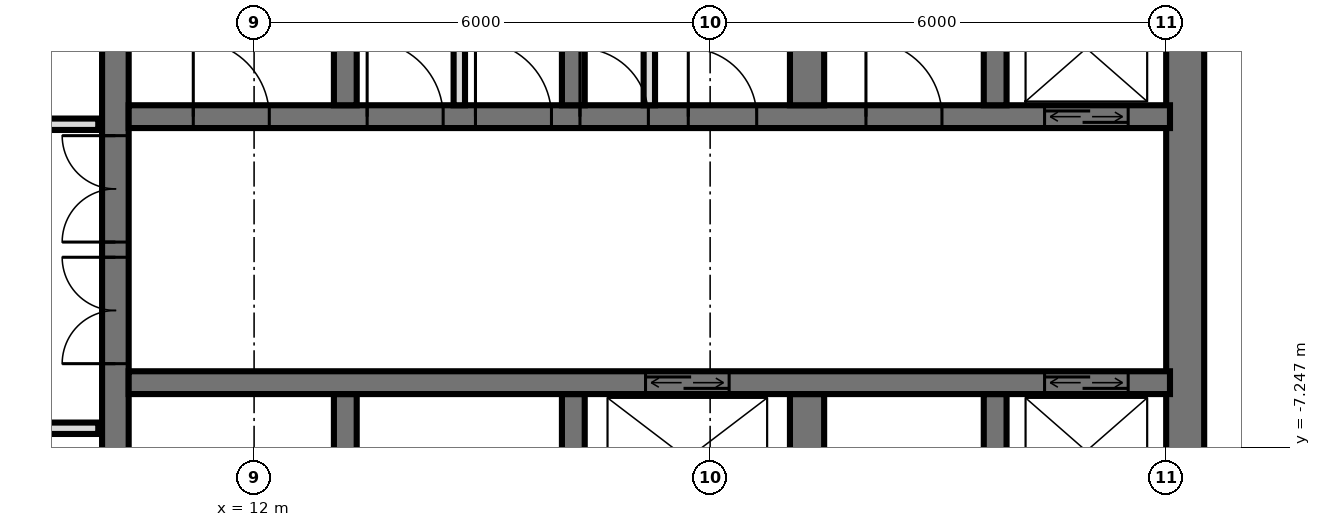
"""IFC4 building model, lengths in metres.
Left out: names, types, materials, properties, quantities, classifications, styles, units other than length and angle.
Written with IfcOpenShell. Run it as: python <this file> out.ifc"""

import sys

from ifc_helpers import new_model, si_unit, direction, frame, frame_2d, origin, place, context, subcontext, project, spatial, rectangle, extrude, element, fill, save


model = new_model("IFC4")
c1 = context("Model", 3, precision=1e-05, world=origin(), true_north=direction((0.0, 1.0)))
c2 = subcontext(c1, "Body", "Model", "MODEL_VIEW")
j1 = project(units=[si_unit("LENGTHUNIT", "METRE"), si_unit("PLANEANGLEUNIT", "RADIAN")], contexts=[c1])
p1 = place(None, origin())
s1 = spatial("IfcSite", under=j1, at=p1, CompositionType="ELEMENT")
p2 = place(p1, origin())
s2 = spatial("IfcBuilding", under=s1, at=p2, CompositionType="ELEMENT")
p3 = place(p2, frame((0.0, 0.0, 123.6)))
s3 = spatial("IfcBuildingStorey", under=s2, at=p3, CompositionType="ELEMENT", Elevation=123.6)
p4 = place(p3, frame((10.175, -14.55, 0.0), z_axis=(0.0, 0.0, 1.0), x_axis=(0.0, 1.0, 0.0)))
e1 = element("IfcWall", 1, at=p4, inside=s3, PredefinedType="SHEAR", context=c2, shape_type="SweptSolid", body=[
    extrude(rectangle(XDim=14.1, YDim=0.35, at=frame_2d((7.05, 0.0))), origin(), (0.0, 0.0, 1.0), 3.6),
])
p5 = place(p4, frame((8.4, 0.0, 0.0)))
e2 = element("IfcOpeningElement", 2, at=p5, cuts=e1, PredefinedType="OPENING", context=c2, shape_type="SweptSolid", body=[
    extrude(rectangle(XDim=1.4, YDim=2.4, at=frame_2d((0.7, 1.2))), frame((0.0, 0.185, 0.0), z_axis=(0.0, -1.0, 0.0), x_axis=(1.0, 0.0, 0.0)), (0.0, 0.0, 1.0), 0.37),
])
p6 = place(p4, frame((10.0, 0.0, 0.0)))
e3 = element("IfcOpeningElement", 3, at=p6, cuts=e1, PredefinedType="OPENING", context=c2, shape_type="SweptSolid", body=[
    extrude(rectangle(XDim=1.4, YDim=2.4, at=frame_2d((0.7, 1.2))), frame((0.0, 0.185, 0.0), z_axis=(0.0, -1.0, 0.0), x_axis=(1.0, 0.0, 0.0)), (0.0, 0.0, 1.0), 0.37),
])
p7 = place(p4, frame((4.0, 0.0, 0.0)))
e4 = element("IfcOpeningElement", 4, at=p7, cuts=e1, PredefinedType="OPENING", context=c2, shape_type="SweptSolid", body=[
    extrude(rectangle(XDim=1.2, YDim=2.1, at=frame_2d((0.6, 1.05))), frame((0.0, 0.185, 0.0), z_axis=(0.0, -1.0, 0.0), x_axis=(1.0, 0.0, 0.0)), (0.0, 0.0, 1.0), 0.37),
])
p8 = place(p3, frame((24.25, -14.55, 0.0), z_axis=(0.0, 0.0, 1.0), x_axis=(0.0, 1.0, 0.0)))
e5 = element("IfcWall", 5, at=p8, inside=s3, PredefinedType="SHEAR", context=c2, shape_type="SweptSolid", body=[
    extrude(rectangle(XDim=14.1, YDim=0.5, at=frame_2d((7.05, 0.0))), origin(), (0.0, 0.0, 1.0), 3.6),
])
p9 = place(p3, frame((10.35, -2.9, 0.0), z_axis=(0.0, 0.0, 1.0), x_axis=(1.0, 0.0, 0.0)))
e6 = element("IfcWall", 6, at=p9, inside=s3, PredefinedType="SHEAR", context=c2, shape_type="SweptSolid", body=[
    extrude(rectangle(XDim=13.7, YDim=0.3, at=frame_2d((6.85, 0.0))), origin(), (0.0, 0.0, 1.0), 3.6),
])
p10 = place(p9, frame((12.05, 0.0, 0.0)))
e7 = element("IfcOpeningElement", 7, at=p10, cuts=e6, PredefinedType="OPENING", context=c2, shape_type="SweptSolid", body=[
    extrude(rectangle(XDim=1.1, YDim=2.1, at=frame_2d((0.55, 1.05))), frame((0.0, 0.16, 0.0), z_axis=(0.0, -1.0, 0.0), x_axis=(1.0, 0.0, 0.0)), (0.0, 0.0, 1.0), 0.32),
])
p11 = place(p9, frame((5.938, 0.0, 0.0)))
e8 = element("IfcOpeningElement", 8, at=p11, cuts=e6, PredefinedType="OPENING", context=c2, shape_type="SweptSolid", body=[
    extrude(rectangle(XDim=0.9, YDim=2.1, at=frame_2d((0.45, 1.05))), frame((0.0, 0.16, 0.0), z_axis=(0.0, -1.0, 0.0), x_axis=(1.0, 0.0, 0.0)), (0.0, 0.0, 1.0), 0.32),
])
p12 = place(p9, frame((7.363, 0.0, 0.0)))
e9 = element("IfcOpeningElement", 9, at=p12, cuts=e6, PredefinedType="OPENING", context=c2, shape_type="SweptSolid", body=[
    extrude(rectangle(XDim=0.9, YDim=2.1, at=frame_2d((0.45, 1.05))), frame((0.0, 0.16, 0.0), z_axis=(0.0, -1.0, 0.0), x_axis=(1.0, 0.0, 0.0)), (0.0, 0.0, 1.0), 0.32),
])
p13 = place(p9, frame((0.85, 0.0, 0.0)))
e10 = element("IfcOpeningElement", 10, at=p13, cuts=e6, PredefinedType="OPENING", context=c2, shape_type="SweptSolid", body=[
    extrude(rectangle(XDim=1.0, YDim=2.1, at=frame_2d((0.5, 1.05))), frame((0.0, 0.16, 0.0), z_axis=(0.0, -1.0, 0.0), x_axis=(1.0, 0.0, 0.0)), (0.0, 0.0, 1.0), 0.32),
])
p14 = place(p9, frame((3.137, 0.0, 0.0)))
e11 = element("IfcOpeningElement", 11, at=p14, cuts=e6, PredefinedType="OPENING", context=c2, shape_type="SweptSolid", body=[
    extrude(rectangle(XDim=1.0, YDim=2.1, at=frame_2d((0.5, 1.05))), frame((0.0, 0.16, 0.0), z_axis=(0.0, -1.0, 0.0), x_axis=(1.0, 0.0, 0.0)), (0.0, 0.0, 1.0), 0.32),
])
p15 = place(p9, frame((4.562, 0.0, 0.0)))
e12 = element("IfcOpeningElement", 12, at=p15, cuts=e6, PredefinedType="OPENING", context=c2, shape_type="SweptSolid", body=[
    extrude(rectangle(XDim=1.0, YDim=2.1, at=frame_2d((0.5, 1.05))), frame((0.0, 0.16, 0.0), z_axis=(0.0, -1.0, 0.0), x_axis=(1.0, 0.0, 0.0)), (0.0, 0.0, 1.0), 0.32),
])
p16 = place(p9, frame((9.7, 0.0, 0.0)))
e13 = element("IfcOpeningElement", 13, at=p16, cuts=e6, PredefinedType="OPENING", context=c2, shape_type="SweptSolid", body=[
    extrude(rectangle(XDim=1.0, YDim=2.1, at=frame_2d((0.5, 1.05))), frame((0.0, 0.16, 0.0), z_axis=(0.0, -1.0, 0.0), x_axis=(1.0, 0.0, 0.0)), (0.0, 0.0, 1.0), 0.32),
])
p17 = place(p3, frame((10.35, -6.4, 0.0), z_axis=(0.0, 0.0, 1.0), x_axis=(1.0, 0.0, 0.0)))
e14 = element("IfcWall", 14, at=p17, inside=s3, PredefinedType="SHEAR", context=c2, shape_type="SweptSolid", body=[
    extrude(rectangle(XDim=13.7, YDim=0.3, at=frame_2d((6.85, 0.0))), origin(), (0.0, 0.0, 1.0), 3.6),
])
p18 = place(p17, frame((12.05, 0.0, 0.0)))
e15 = element("IfcOpeningElement", 15, at=p18, cuts=e14, PredefinedType="OPENING", context=c2, shape_type="SweptSolid", body=[
    extrude(rectangle(XDim=1.1, YDim=2.1, at=frame_2d((0.55, 1.05))), frame((0.0, 0.16, 0.0), z_axis=(0.0, -1.0, 0.0), x_axis=(1.0, 0.0, 0.0)), (0.0, 0.0, 1.0), 0.32),
])
p19 = place(p17, frame((6.8, 0.0, 0.0)))
e16 = element("IfcOpeningElement", 16, at=p19, cuts=e14, PredefinedType="OPENING", context=c2, shape_type="SweptSolid", body=[
    extrude(rectangle(XDim=1.1, YDim=2.1, at=frame_2d((0.55, 1.05))), frame((0.0, 0.16, 0.0), z_axis=(0.0, -1.0, 0.0), x_axis=(1.0, 0.0, 0.0)), (0.0, 0.0, 1.0), 0.32),
])
for number, where, z_axis, x_axis in (
    (17, (13.2, -2.75, 0.0), (0.0, 0.0, 1.0), (0.0, 1.0, 0.0)),
    (18, (13.2, -8.85, 0.0), (0.0, 0.0, 1.0), (0.0, 1.0, 0.0)),
    (19, (16.2, -2.75, 0.0), (0.0, 0.0, 1.0), (0.0, 1.0, 0.0)),
    (20, (16.2, -8.85, 0.0), (0.0, 0.0, 1.0), (0.0, 1.0, 0.0)),
):
    element("IfcWall", number, at=place(p3, frame(where, z_axis=z_axis, x_axis=x_axis)), inside=s3, PredefinedType="SHEAR", context=c2, shape_type="SweptSolid", body=[
        extrude(rectangle(XDim=2.3, YDim=0.3, at=frame_2d((1.15, 0.0))), origin(), (0.0, 0.0, 1.0), 3.6),
    ])
for number, where, z_axis, x_axis in (
    (21, (19.275, -2.75, 0.0), (0.0, 0.0, 1.0), (0.0, 1.0, 0.0)),
    (22, (19.275, -8.85, 0.0), (0.0, 0.0, 1.0), (0.0, 1.0, 0.0)),
):
    element("IfcWall", number, at=place(p3, frame(where, z_axis=z_axis, x_axis=x_axis)), inside=s3, PredefinedType="SHEAR", context=c2, shape_type="SweptSolid", body=[
        extrude(rectangle(XDim=2.3, YDim=0.45, at=frame_2d((1.15, 0.0))), origin(), (0.0, 0.0, 1.0), 3.6),
    ])
for number, where, z_axis, x_axis in (
    (23, (21.75, -2.75, 0.0), (0.0, 0.0, 1.0), (0.0, 1.0, 0.0)),
    (24, (21.75, -8.85, 0.0), (0.0, 0.0, 1.0), (0.0, 1.0, 0.0)),
):
    element("IfcWall", number, at=place(p3, frame(where, z_axis=z_axis, x_axis=x_axis)), inside=s3, PredefinedType="SHEAR", context=c2, shape_type="SweptSolid", body=[
        extrude(rectangle(XDim=2.3, YDim=0.3, at=frame_2d((1.15, 0.0))), origin(), (0.0, 0.0, 1.0), 3.6),
    ])
for number, where, z_axis, x_axis in (
    (25, (17.2, -2.75, 0.0), (0.0, 0.0, 1.0), (0.0, 1.0, 0.0)),
    (26, (14.7, -2.75, 0.0), (0.0, 0.0, 1.0), (0.0, 1.0, 0.0)),
):
    element("IfcWall", number, at=place(p3, frame(where, z_axis=z_axis, x_axis=x_axis)), inside=s3, PredefinedType="PARTITIONING", context=c2, shape_type="SweptSolid", body=[
        extrude(rectangle(XDim=2.3, YDim=0.15, at=frame_2d((1.15, 0.0))), origin(), (0.0, 0.0, 1.0), 3.3),
    ])
p20 = place(p3, frame((-9.95, -7.0, 0.0), z_axis=(0.0, 0.0, 1.0), x_axis=(1.0, 0.0, 0.0)))
e27 = element("IfcWall", 27, at=p20, inside=s3, PredefinedType="PARTITIONING", context=c2, shape_type="SweptSolid", body=[
    extrude(rectangle(XDim=19.9, YDim=0.15, at=frame_2d((9.95, 0.0))), origin(), (0.0, 0.0, 1.0), 3.32),
])
p21 = place(p20, frame((9.45, 0.0, 0.0)))
e28 = element("IfcOpeningElement", 28, at=p21, cuts=e27, PredefinedType="OPENING", context=c2, shape_type="SweptSolid", body=[
    extrude(rectangle(XDim=1.0, YDim=2.1, at=frame_2d((0.5, 1.05))), frame((0.0, 0.085, 0.0), z_axis=(0.0, -1.0, 0.0), x_axis=(1.0, 0.0, 0.0)), (0.0, 0.0, 1.0), 0.17),
])
p22 = place(p20, frame((15.45, 0.0, 0.0)))
e29 = element("IfcOpeningElement", 29, at=p22, cuts=e27, PredefinedType="OPENING", context=c2, shape_type="SweptSolid", body=[
    extrude(rectangle(XDim=1.0, YDim=2.1, at=frame_2d((0.5, 1.05))), frame((0.0, 0.085, 0.0), z_axis=(0.0, -1.0, 0.0), x_axis=(1.0, 0.0, 0.0)), (0.0, 0.0, 1.0), 0.17),
])
p23 = place(p3, frame((-9.95, -3.0, 0.0), z_axis=(0.0, 0.0, 1.0), x_axis=(1.0, 0.0, 0.0)))
e30 = element("IfcWall", 30, at=p23, inside=s3, PredefinedType="PARTITIONING", context=c2, shape_type="SweptSolid", body=[
    extrude(rectangle(XDim=19.9, YDim=0.15, at=frame_2d((9.95, 0.0))), origin(), (0.0, 0.0, 1.0), 3.32),
])
p24 = place(p23, frame((1.7, 0.0, 0.0)))
e31 = element("IfcOpeningElement", 31, at=p24, cuts=e30, PredefinedType="OPENING", context=c2, shape_type="SweptSolid", body=[
    extrude(rectangle(XDim=1.0, YDim=2.1, at=frame_2d((0.5, 1.05))), frame((0.0, 0.085, 0.0), z_axis=(0.0, -1.0, 0.0), x_axis=(1.0, 0.0, 0.0)), (0.0, 0.0, 1.0), 0.17),
])
p25 = place(p23, frame((5.45, 0.0, 0.0)))
e32 = element("IfcOpeningElement", 32, at=p25, cuts=e30, PredefinedType="OPENING", context=c2, shape_type="SweptSolid", body=[
    extrude(rectangle(XDim=1.0, YDim=2.1, at=frame_2d((0.5, 1.05))), frame((0.0, 0.085, 0.0), z_axis=(0.0, -1.0, 0.0), x_axis=(1.0, 0.0, 0.0)), (0.0, 0.0, 1.0), 0.17),
])
p26 = place(p23, frame((8.2, 0.0, 0.0)))
e33 = element("IfcOpeningElement", 33, at=p26, cuts=e30, PredefinedType="OPENING", context=c2, shape_type="SweptSolid", body=[
    extrude(rectangle(XDim=1.0, YDim=2.1, at=frame_2d((0.5, 1.05))), frame((0.0, 0.085, 0.0), z_axis=(0.0, -1.0, 0.0), x_axis=(1.0, 0.0, 0.0)), (0.0, 0.0, 1.0), 0.17),
])
p27 = place(p23, frame((11.95, 0.0, 0.0)))
e34 = element("IfcOpeningElement", 34, at=p27, cuts=e30, PredefinedType="OPENING", context=c2, shape_type="SweptSolid", body=[
    extrude(rectangle(XDim=1.0, YDim=2.1, at=frame_2d((0.5, 1.05))), frame((0.0, 0.085, 0.0), z_axis=(0.0, -1.0, 0.0), x_axis=(1.0, 0.0, 0.0)), (0.0, 0.0, 1.0), 0.17),
])
p28 = place(p23, frame((16.95, 0.0, 0.0)))
e35 = element("IfcOpeningElement", 35, at=p28, cuts=e30, PredefinedType="OPENING", context=c2, shape_type="SweptSolid", body=[
    extrude(rectangle(XDim=1.0, YDim=2.1, at=frame_2d((0.5, 1.05))), frame((0.0, 0.085, 0.0), z_axis=(0.0, -1.0, 0.0), x_axis=(1.0, 0.0, 0.0)), (0.0, 0.0, 1.0), 0.17),
])
p29 = place(p10, origin())
e36 = element("IfcDoor", 36, at=p29, inside=s3, OperationType="DOUBLE_DOOR_SLIDING", PredefinedType="USERDEFINED", context=c2, shape_type="SweptSolid", body=[
    extrude(rectangle(XDim=1.1, YDim=2.1, at=frame_2d((0.55, 1.05))), frame((0.0, 0.025, 0.0), z_axis=(0.0, -1.0, 0.0), x_axis=(1.0, 0.0, 0.0)), (0.0, 0.0, 1.0), 0.05),
])
fill(e7, e36)
p30 = place(p18, origin())
e37 = element("IfcDoor", 37, at=p30, inside=s3, OperationType="DOUBLE_DOOR_SLIDING", PredefinedType="USERDEFINED", context=c2, shape_type="SweptSolid", body=[
    extrude(rectangle(XDim=1.1, YDim=2.1, at=frame_2d((0.55, 1.05))), frame((0.0, 0.025, 0.0), z_axis=(0.0, -1.0, 0.0), x_axis=(1.0, 0.0, 0.0)), (0.0, 0.0, 1.0), 0.05),
])
fill(e15, e37)
p31 = place(p19, origin())
e38 = element("IfcDoor", 38, at=p31, inside=s3, OperationType="DOUBLE_DOOR_SLIDING", PredefinedType="USERDEFINED", context=c2, shape_type="SweptSolid", body=[
    extrude(rectangle(XDim=1.1, YDim=2.1, at=frame_2d((0.55, 1.05))), frame((0.0, 0.025, 0.0), z_axis=(0.0, -1.0, 0.0), x_axis=(1.0, 0.0, 0.0)), (0.0, 0.0, 1.0), 0.05),
])
fill(e16, e38)
p32 = place(p5, origin())
e39 = element("IfcDoor", 39, at=p32, inside=s3, OperationType="DOUBLE_DOOR_SINGLE_SWING", PredefinedType="DOOR", context=c2, shape_type="SweptSolid", body=[
    extrude(rectangle(XDim=1.4, YDim=2.4, at=frame_2d((0.7, 1.2))), frame((0.0, 0.025, 0.0), z_axis=(0.0, -1.0, 0.0), x_axis=(1.0, 0.0, 0.0)), (0.0, 0.0, 1.0), 0.05),
])
fill(e2, e39)
p33 = place(p6, origin())
e40 = element("IfcDoor", 40, at=p33, inside=s3, OperationType="DOUBLE_DOOR_SINGLE_SWING", PredefinedType="DOOR", context=c2, shape_type="SweptSolid", body=[
    extrude(rectangle(XDim=1.4, YDim=2.4, at=frame_2d((0.7, 1.2))), frame((0.0, 0.025, 0.0), z_axis=(0.0, -1.0, 0.0), x_axis=(1.0, 0.0, 0.0)), (0.0, 0.0, 1.0), 0.05),
])
fill(e3, e40)
p34 = place(p11, origin())
e41 = element("IfcDoor", 41, at=p34, inside=s3, OperationType="SINGLE_SWING_RIGHT", PredefinedType="DOOR", context=c2, shape_type="SweptSolid", body=[
    extrude(rectangle(XDim=0.9, YDim=2.1, at=frame_2d((0.45, 1.05))), frame((0.0, 0.025, 0.0), z_axis=(0.0, -1.0, 0.0), x_axis=(1.0, 0.0, 0.0)), (0.0, 0.0, 1.0), 0.05),
])
fill(e8, e41)
p35 = place(p12, origin())
e42 = element("IfcDoor", 42, at=p35, inside=s3, OperationType="SINGLE_SWING_RIGHT", PredefinedType="DOOR", context=c2, shape_type="SweptSolid", body=[
    extrude(rectangle(XDim=0.9, YDim=2.1, at=frame_2d((0.45, 1.05))), frame((0.0, 0.025, 0.0), z_axis=(0.0, -1.0, 0.0), x_axis=(1.0, 0.0, 0.0)), (0.0, 0.0, 1.0), 0.05),
])
fill(e9, e42)
p36 = place(p13, origin())
e43 = element("IfcDoor", 43, at=p36, inside=s3, OperationType="SINGLE_SWING_RIGHT", PredefinedType="DOOR", context=c2, shape_type="SweptSolid", body=[
    extrude(rectangle(XDim=1.0, YDim=2.1, at=frame_2d((0.5, 1.05))), frame((0.0, 0.025, 0.0), z_axis=(0.0, -1.0, 0.0), x_axis=(1.0, 0.0, 0.0)), (0.0, 0.0, 1.0), 0.05),
])
fill(e10, e43)
p37 = place(p14, origin())
e44 = element("IfcDoor", 44, at=p37, inside=s3, OperationType="SINGLE_SWING_RIGHT", PredefinedType="DOOR", context=c2, shape_type="SweptSolid", body=[
    extrude(rectangle(XDim=1.0, YDim=2.1, at=frame_2d((0.5, 1.05))), frame((0.0, 0.025, 0.0), z_axis=(0.0, -1.0, 0.0), x_axis=(1.0, 0.0, 0.0)), (0.0, 0.0, 1.0), 0.05),
])
fill(e11, e44)
p38 = place(p15, origin())
e45 = element("IfcDoor", 45, at=p38, inside=s3, OperationType="SINGLE_SWING_RIGHT", PredefinedType="DOOR", context=c2, shape_type="SweptSolid", body=[
    extrude(rectangle(XDim=1.0, YDim=2.1, at=frame_2d((0.5, 1.05))), frame((0.0, 0.025, 0.0), z_axis=(0.0, -1.0, 0.0), x_axis=(1.0, 0.0, 0.0)), (0.0, 0.0, 1.0), 0.05),
])
fill(e12, e45)
p39 = place(p16, origin())
e46 = element("IfcDoor", 46, at=p39, inside=s3, OperationType="SINGLE_SWING_RIGHT", PredefinedType="DOOR", context=c2, shape_type="SweptSolid", body=[
    extrude(rectangle(XDim=1.0, YDim=2.1, at=frame_2d((0.5, 1.05))), frame((0.0, 0.025, 0.0), z_axis=(0.0, -1.0, 0.0), x_axis=(1.0, 0.0, 0.0)), (0.0, 0.0, 1.0), 0.05),
])
fill(e13, e46)
save(model, sys.argv[1])
